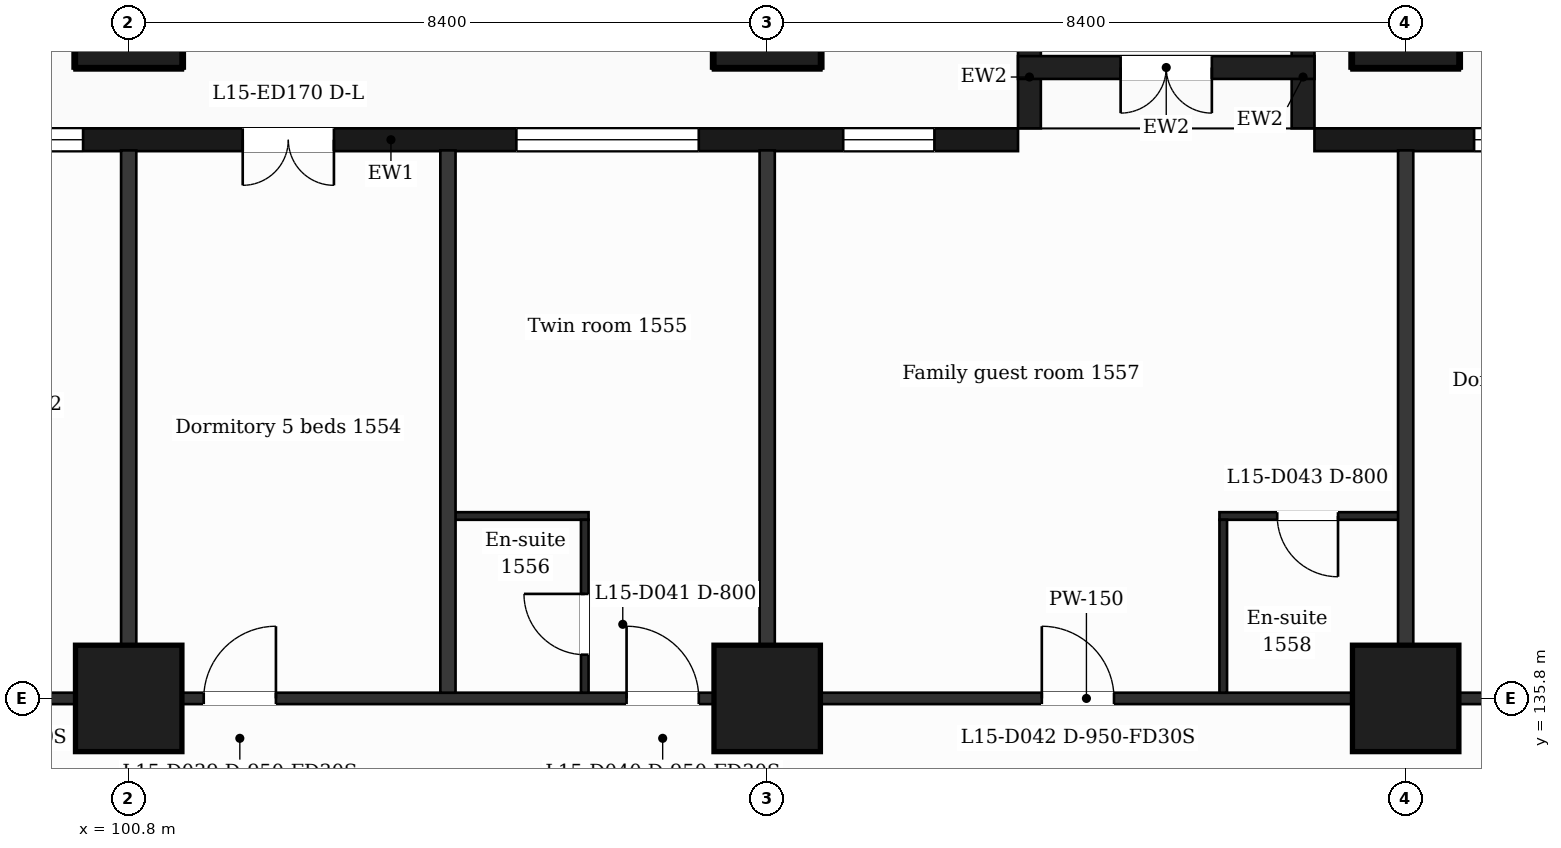
"""IFC4 building model, lengths in metres.
Left out: names, types, materials, properties, quantities, classifications, styles, units other than length and angle.
Written with IfcOpenShell. Run it as: python <this file> out.ifc"""

import sys

from ifc_helpers import new_model, si_unit, direction, frame, frame_2d, origin, origin_2d, place, context, subcontext, project, spatial, rectangle, extrude, element, fill, save


model = new_model("IFC4")
c1 = context("Model", 3, precision=1e-05, world=origin(), true_north=direction((0.0, 1.0)))
c2 = subcontext(c1, "Body", "Model", "MODEL_VIEW")
j1 = project(units=[si_unit("LENGTHUNIT", "METRE"), si_unit("PLANEANGLEUNIT", "RADIAN")], contexts=[c1])
p1 = place(None, origin())
s1 = spatial("IfcSite", under=j1, at=p1, CompositionType="ELEMENT")
p2 = place(p1, origin())
s2 = spatial("IfcBuilding", under=s1, at=p2, CompositionType="ELEMENT")
p3 = place(p2, frame((0.0, 0.0, 70.5)))
s3 = spatial("IfcBuildingStorey", under=s2, at=p3, CompositionType="ELEMENT", Elevation=70.5)
for number, where, z_axis, x_axis in (
    (1, (100.8, 135.8, 0.0), (0.0, 0.0, 1.0), (1.0, 0.0, 0.0)),
    (2, (109.2, 135.8, 0.0), (0.0, 0.0, 1.0), (1.0, 0.0, 0.0)),
    (3, (117.6, 135.8, 0.0), (0.0, 0.0, 1.0), (1.0, 0.0, 0.0)),
    (4, (100.8, 144.8, 0.0), (0.0, 0.0, 1.0), (1.0, 0.0, 0.0)),
    (5, (109.2, 144.8, 0.0), (0.0, 0.0, 1.0), (1.0, 0.0, 0.0)),
    (6, (117.6, 144.8, 0.0), (0.0, 0.0, 1.0), (1.0, 0.0, 0.0)),
):
    element("IfcColumn", number, at=place(p3, frame(where, z_axis=z_axis, x_axis=x_axis)), inside=s3, PredefinedType="COLUMN", context=c2, shape_type="SweptSolid", body=[
        extrude(rectangle(XDim=1.4, YDim=1.4, at=origin_2d()), origin(), (0.0, 0.0, 1.0), 3.5),
    ])
p4 = place(p3, frame((130.65, 143.15, 0.0), z_axis=(0.0, 0.0, 1.0), x_axis=(-1.0, 0.0, 0.0)))
e7 = element("IfcWall", 7, at=p4, inside=s3, PredefinedType="SOLIDWALL", context=c2, shape_type="SweptSolid", body=[
    extrude(rectangle(XDim=14.25, YDim=0.3, at=frame_2d((7.125, 0.0))), origin(), (0.0, 0.0, 1.0), 3.18),
])
p5 = place(p4, frame((1.35, 0.0, 0.9)))
e8 = element("IfcOpeningElement", 8, at=p5, cuts=e7, PredefinedType="OPENING", context=c2, shape_type="SweptSolid", body=[
    extrude(rectangle(XDim=2.4, YDim=2.1, at=frame_2d((1.2, 1.05))), frame((0.0, 0.16, 0.0), z_axis=(0.0, -1.0, 0.0), x_axis=(1.0, 0.0, 0.0)), (0.0, 0.0, 1.0), 0.32),
])
p6 = place(p4, frame((6.15, 0.0, 0.0)))
e9 = element("IfcOpeningElement", 9, at=p6, cuts=e7, PredefinedType="OPENING", context=c2, shape_type="SweptSolid", body=[
    extrude(rectangle(XDim=1.2, YDim=2.4, at=frame_2d((0.6, 1.2))), frame((0.0, 0.16, 0.0), z_axis=(0.0, -1.0, 0.0), x_axis=(1.0, 0.0, 0.0)), (0.0, 0.0, 1.0), 0.32),
])
p7 = place(p4, frame((9.75, 0.0, 0.9)))
e10 = element("IfcOpeningElement", 10, at=p7, cuts=e7, PredefinedType="OPENING", context=c2, shape_type="SweptSolid", body=[
    extrude(rectangle(XDim=2.4, YDim=2.1, at=frame_2d((1.2, 1.05))), frame((0.0, 0.16, 0.0), z_axis=(0.0, -1.0, 0.0), x_axis=(1.0, 0.0, 0.0)), (0.0, 0.0, 1.0), 0.32),
])
p8 = place(p3, frame((112.5, 143.15, 0.0), z_axis=(0.0, 0.0, 1.0), x_axis=(-1.0, 0.0, 0.0)))
e11 = element("IfcWall", 11, at=p8, inside=s3, PredefinedType="SOLIDWALL", context=c2, shape_type="SweptSolid", body=[
    extrude(rectangle(XDim=16.5, YDim=0.3, at=frame_2d((8.25, 0.0))), origin(), (0.0, 0.0, 1.0), 3.18),
])
p9 = place(p8, frame((1.1, 0.0, 0.9)))
e12 = element("IfcOpeningElement", 12, at=p9, cuts=e11, PredefinedType="OPENING", context=c2, shape_type="SweptSolid", body=[
    extrude(rectangle(XDim=1.2, YDim=2.1, at=frame_2d((0.6, 1.05))), frame((0.0, 0.16, 0.0), z_axis=(0.0, -1.0, 0.0), x_axis=(1.0, 0.0, 0.0)), (0.0, 0.0, 1.0), 0.32),
])
p10 = place(p8, frame((4.2, 0.0, 0.9)))
e13 = element("IfcOpeningElement", 13, at=p10, cuts=e11, PredefinedType="OPENING", context=c2, shape_type="SweptSolid", body=[
    extrude(rectangle(XDim=2.4, YDim=2.1, at=frame_2d((1.2, 1.05))), frame((0.0, 0.16, 0.0), z_axis=(0.0, -1.0, 0.0), x_axis=(1.0, 0.0, 0.0)), (0.0, 0.0, 1.0), 0.32),
])
p11 = place(p8, frame((9.0, 0.0, 0.0)))
e14 = element("IfcOpeningElement", 14, at=p11, cuts=e11, PredefinedType="OPENING", context=c2, shape_type="SweptSolid", body=[
    extrude(rectangle(XDim=1.2, YDim=2.4, at=frame_2d((0.6, 1.2))), frame((0.0, 0.16, 0.0), z_axis=(0.0, -1.0, 0.0), x_axis=(1.0, 0.0, 0.0)), (0.0, 0.0, 1.0), 0.32),
])
p12 = place(p8, frame((12.3, 0.0, 0.9)))
e15 = element("IfcOpeningElement", 15, at=p12, cuts=e11, PredefinedType="OPENING", context=c2, shape_type="SweptSolid", body=[
    extrude(rectangle(XDim=1.2, YDim=2.1, at=frame_2d((0.6, 1.05))), frame((0.0, 0.16, 0.0), z_axis=(0.0, -1.0, 0.0), x_axis=(1.0, 0.0, 0.0)), (0.0, 0.0, 1.0), 0.32),
])
p13 = place(p8, frame((14.1, 0.0, 0.9)))
e16 = element("IfcOpeningElement", 16, at=p13, cuts=e11, PredefinedType="OPENING", context=c2, shape_type="SweptSolid", body=[
    extrude(rectangle(XDim=1.2, YDim=2.1, at=frame_2d((0.6, 1.05))), frame((0.0, 0.16, 0.0), z_axis=(0.0, -1.0, 0.0), x_axis=(1.0, 0.0, 0.0)), (0.0, 0.0, 1.0), 0.32),
])
for number, where, z_axis, x_axis in (
    (17, (116.25, 143.3, 0.0), (0.0, 0.0, 1.0), (0.0, 1.0, 0.0)),
    (18, (112.65, 143.3, 0.0), (0.0, 0.0, 1.0), (0.0, 1.0, 0.0)),
):
    element("IfcWall", number, at=place(p3, frame(where, z_axis=z_axis, x_axis=x_axis)), inside=s3, PredefinedType="SOLIDWALL", context=c2, shape_type="SweptSolid", body=[
        extrude(rectangle(XDim=1.35, YDim=0.3, at=frame_2d((0.675, 0.0))), origin(), (0.0, 0.0, 1.0), 3.18),
    ])
p14 = place(p3, frame((116.4, 144.1, 0.0), z_axis=(0.0, 0.0, 1.0), x_axis=(-1.0, 0.0, 0.0)))
e19 = element("IfcWall", 19, at=p14, inside=s3, PredefinedType="SOLIDWALL", context=c2, shape_type="SweptSolid", body=[
    extrude(rectangle(XDim=3.9, YDim=0.3, at=frame_2d((1.95, 0.0))), origin(), (0.0, 0.0, 1.0), 3.18),
])
p15 = place(p14, frame((1.35, 0.0, 0.0)))
e20 = element("IfcOpeningElement", 20, at=p15, cuts=e19, PredefinedType="OPENING", context=c2, shape_type="SweptSolid", body=[
    extrude(rectangle(XDim=1.2, YDim=2.4, at=frame_2d((0.6, 1.2))), frame((0.0, 0.16, 0.0), z_axis=(0.0, -1.0, 0.0), x_axis=(1.0, 0.0, 0.0)), (0.0, 0.0, 1.0), 0.32),
])
p16 = place(p3, frame((90.895, 135.8, 0.0), z_axis=(0.0, 0.0, 1.0), x_axis=(1.0, 0.0, 0.0)))
e21 = element("IfcWall", 21, at=p16, inside=s3, PredefinedType="PARTITIONING", context=c2, shape_type="SweptSolid", body=[
    extrude(rectangle(XDim=45.011, YDim=0.15, at=frame_2d((22.505, 0.0))), origin(), (0.0, 0.0, 1.0), 3.18),
])
p17 = place(p16, frame((7.068, 0.0, 0.0)))
e22 = element("IfcOpeningElement", 22, at=p17, cuts=e21, PredefinedType="OPENING", context=c2, shape_type="SweptSolid", body=[
    extrude(rectangle(XDim=0.95, YDim=2.1, at=frame_2d((0.475, 1.05))), frame((0.0, 0.085, 0.0), z_axis=(0.0, -1.0, 0.0), x_axis=(1.0, 0.0, 0.0)), (0.0, 0.0, 1.0), 0.17),
])
p18 = place(p16, frame((10.892, 0.0, 0.0)))
e23 = element("IfcOpeningElement", 23, at=p18, cuts=e21, PredefinedType="OPENING", context=c2, shape_type="SweptSolid", body=[
    extrude(rectangle(XDim=0.95, YDim=2.1, at=frame_2d((0.475, 1.05))), frame((0.0, 0.085, 0.0), z_axis=(0.0, -1.0, 0.0), x_axis=(1.0, 0.0, 0.0)), (0.0, 0.0, 1.0), 0.17),
])
p19 = place(p16, frame((16.455, 0.0, 0.0)))
e24 = element("IfcOpeningElement", 24, at=p19, cuts=e21, PredefinedType="OPENING", context=c2, shape_type="SweptSolid", body=[
    extrude(rectangle(XDim=0.95, YDim=2.1, at=frame_2d((0.475, 1.05))), frame((0.0, 0.085, 0.0), z_axis=(0.0, -1.0, 0.0), x_axis=(1.0, 0.0, 0.0)), (0.0, 0.0, 1.0), 0.17),
])
p20 = place(p16, frame((21.918, 0.0, 0.0)))
e25 = element("IfcOpeningElement", 25, at=p20, cuts=e21, PredefinedType="OPENING", context=c2, shape_type="SweptSolid", body=[
    extrude(rectangle(XDim=0.95, YDim=2.1, at=frame_2d((0.475, 1.05))), frame((0.0, 0.085, 0.0), z_axis=(0.0, -1.0, 0.0), x_axis=(1.0, 0.0, 0.0)), (0.0, 0.0, 1.0), 0.17),
])
p21 = place(p16, frame((28.969, 0.0, 0.0)))
e26 = element("IfcOpeningElement", 26, at=p21, cuts=e21, PredefinedType="OPENING", context=c2, shape_type="SweptSolid", body=[
    extrude(rectangle(XDim=0.95, YDim=2.1, at=frame_2d((0.475, 1.05))), frame((0.0, 0.085, 0.0), z_axis=(0.0, -1.0, 0.0), x_axis=(1.0, 0.0, 0.0)), (0.0, 0.0, 1.0), 0.17),
])
p22 = place(p16, frame((32.531, 0.0, 0.0)))
e27 = element("IfcOpeningElement", 27, at=p22, cuts=e21, PredefinedType="OPENING", context=c2, shape_type="SweptSolid", body=[
    extrude(rectangle(XDim=0.95, YDim=2.1, at=frame_2d((0.475, 1.05))), frame((0.0, 0.085, 0.0), z_axis=(0.0, -1.0, 0.0), x_axis=(1.0, 0.0, 0.0)), (0.0, 0.0, 1.0), 0.17),
])
p23 = place(p16, frame((40.929, 0.0, 0.0)))
e28 = element("IfcOpeningElement", 28, at=p23, cuts=e21, PredefinedType="OPENING", context=c2, shape_type="SweptSolid", body=[
    extrude(rectangle(XDim=0.95, YDim=2.1, at=frame_2d((0.475, 1.05))), frame((0.0, 0.085, 0.0), z_axis=(0.0, -1.0, 0.0), x_axis=(1.0, 0.0, 0.0)), (0.0, 0.0, 1.0), 0.17),
])
p24 = place(p3, frame((105.0, 138.2, 0.0), z_axis=(0.0, 0.0, 1.0), x_axis=(1.0, 0.0, 0.0)))
e29 = element("IfcWall", 29, at=p24, inside=s3, PredefinedType="PARTITIONING", context=c2, shape_type="SweptSolid", body=[
    extrude(rectangle(XDim=1.85, YDim=0.1, at=frame_2d((0.925, 0.0))), origin(), (0.0, 0.0, 1.0), 3.18),
])
p25 = place(p3, frame((115.15, 138.2, 0.0), z_axis=(0.0, 0.0, 1.0), x_axis=(1.0, 0.0, 0.0)))
e30 = element("IfcWall", 30, at=p25, inside=s3, PredefinedType="PARTITIONING", context=c2, shape_type="SweptSolid", body=[
    extrude(rectangle(XDim=2.45, YDim=0.1, at=frame_2d((1.225, 0.0))), origin(), (0.0, 0.0, 1.0), 3.18),
])
p26 = place(p25, frame((0.76, 0.0, 0.0)))
e31 = element("IfcOpeningElement", 31, at=p26, cuts=e30, PredefinedType="OPENING", context=c2, shape_type="SweptSolid", body=[
    extrude(rectangle(XDim=0.8, YDim=2.1, at=frame_2d((0.4, 1.05))), frame((0.0, 0.06, 0.0), z_axis=(0.0, -1.0, 0.0), x_axis=(1.0, 0.0, 0.0)), (0.0, 0.0, 1.0), 0.12),
])
for number, where, z_axis, x_axis in (
    (32, (100.8, 135.875, 0.0), (0.0, 0.0, 1.0), (0.0, 1.0, 0.0)),
    (33, (105.0, 135.875, 0.0), (0.0, 0.0, 1.0), (0.0, 1.0, 0.0)),
):
    element("IfcWall", number, at=place(p3, frame(where, z_axis=z_axis, x_axis=x_axis)), inside=s3, PredefinedType="PARTITIONING", context=c2, shape_type="SweptSolid", body=[
        extrude(rectangle(XDim=7.135, YDim=0.2, at=frame_2d((3.567, 0.0))), origin(), (0.0, 0.0, 1.0), 3.18),
    ])
p27 = place(p3, frame((106.8, 135.875, 0.0), z_axis=(0.0, 0.0, 1.0), x_axis=(0.0, 1.0, 0.0)))
e34 = element("IfcWall", 34, at=p27, inside=s3, PredefinedType="PARTITIONING", context=c2, shape_type="SweptSolid", body=[
    extrude(rectangle(XDim=2.275, YDim=0.1, at=frame_2d((1.137, 0.0))), origin(), (0.0, 0.0, 1.0), 3.18),
])
p28 = place(p27, frame((0.5, 0.0, 0.0)))
e35 = element("IfcOpeningElement", 35, at=p28, cuts=e34, PredefinedType="OPENING", context=c2, shape_type="SweptSolid", body=[
    extrude(rectangle(XDim=0.8, YDim=2.1, at=frame_2d((0.4, 1.05))), frame((0.0, 0.06, 0.0), z_axis=(0.0, -1.0, 0.0), x_axis=(1.0, 0.0, 0.0)), (0.0, 0.0, 1.0), 0.12),
])
p29 = place(p3, frame((109.2, 135.875, 0.0), z_axis=(0.0, 0.0, 1.0), x_axis=(0.0, 1.0, 0.0)))
e36 = element("IfcWall", 36, at=p29, inside=s3, PredefinedType="PARTITIONING", context=c2, shape_type="SweptSolid", body=[
    extrude(rectangle(XDim=7.135, YDim=0.2, at=frame_2d((3.567, 0.0))), origin(), (0.0, 0.0, 1.0), 3.18),
])
p30 = place(p3, frame((115.2, 135.875, 0.0), z_axis=(0.0, 0.0, 1.0), x_axis=(0.0, 1.0, 0.0)))
e37 = element("IfcWall", 37, at=p30, inside=s3, PredefinedType="PARTITIONING", context=c2, shape_type="SweptSolid", body=[
    extrude(rectangle(XDim=2.275, YDim=0.1, at=frame_2d((1.137, 0.0))), origin(), (0.0, 0.0, 1.0), 3.18),
])
p31 = place(p3, frame((117.6, 135.875, 0.0), z_axis=(0.0, 0.0, 1.0), x_axis=(0.0, 1.0, 0.0)))
e38 = element("IfcWall", 38, at=p31, inside=s3, PredefinedType="PARTITIONING", context=c2, shape_type="SweptSolid", body=[
    extrude(rectangle(XDim=7.135, YDim=0.2, at=frame_2d((3.567, 0.0))), origin(), (0.0, 0.0, 1.0), 3.18),
])
p32 = place(p7, origin())
e39 = element("IfcWindow", 39, at=p32, inside=s3, PartitioningType="SINGLE_PANEL", PredefinedType="WINDOW", context=c2, shape_type="SweptSolid", body=[
    extrude(rectangle(XDim=2.4, YDim=2.1, at=frame_2d((1.2, 1.05))), frame((0.0, 0.03, 0.0), z_axis=(0.0, -1.0, 0.0), x_axis=(1.0, 0.0, 0.0)), (0.0, 0.0, 1.0), 0.06),
])
fill(e10, e39)
p33 = place(p9, origin())
e40 = element("IfcWindow", 40, at=p33, inside=s3, PartitioningType="SINGLE_PANEL", PredefinedType="WINDOW", context=c2, shape_type="SweptSolid", body=[
    extrude(rectangle(XDim=1.2, YDim=2.1, at=frame_2d((0.6, 1.05))), frame((0.0, 0.03, 0.0), z_axis=(0.0, -1.0, 0.0), x_axis=(1.0, 0.0, 0.0)), (0.0, 0.0, 1.0), 0.06),
])
fill(e12, e40)
p34 = place(p10, origin())
e41 = element("IfcWindow", 41, at=p34, inside=s3, PartitioningType="SINGLE_PANEL", PredefinedType="WINDOW", context=c2, shape_type="SweptSolid", body=[
    extrude(rectangle(XDim=2.4, YDim=2.1, at=frame_2d((1.2, 1.05))), frame((0.0, 0.03, 0.0), z_axis=(0.0, -1.0, 0.0), x_axis=(1.0, 0.0, 0.0)), (0.0, 0.0, 1.0), 0.06),
])
fill(e13, e41)
p35 = place(p11, origin())
e42 = element("IfcDoor", 42, at=p35, inside=s3, OperationType="DOUBLE_DOOR_SINGLE_SWING", PredefinedType="DOOR", context=c2, shape_type="SweptSolid", body=[
    extrude(rectangle(XDim=1.2, YDim=2.4, at=frame_2d((0.6, 1.2))), frame((0.0, 0.025, 0.0), z_axis=(0.0, -1.0, 0.0), x_axis=(1.0, 0.0, 0.0)), (0.0, 0.0, 1.0), 0.05),
])
fill(e14, e42)
p36 = place(p12, origin())
e43 = element("IfcWindow", 43, at=p36, inside=s3, PartitioningType="SINGLE_PANEL", PredefinedType="WINDOW", context=c2, shape_type="SweptSolid", body=[
    extrude(rectangle(XDim=1.2, YDim=2.1, at=frame_2d((0.6, 1.05))), frame((0.0, 0.03, 0.0), z_axis=(0.0, -1.0, 0.0), x_axis=(1.0, 0.0, 0.0)), (0.0, 0.0, 1.0), 0.06),
])
fill(e15, e43)
p37 = place(p15, origin())
e44 = element("IfcDoor", 44, at=p37, inside=s3, OperationType="DOUBLE_DOOR_SINGLE_SWING", PredefinedType="DOOR", context=c2, shape_type="SweptSolid", body=[
    extrude(rectangle(XDim=1.2, YDim=2.4, at=frame_2d((0.6, 1.2))), frame((0.0, 0.025, 0.0), z_axis=(0.0, -1.0, 0.0), x_axis=(1.0, 0.0, 0.0)), (0.0, 0.0, 1.0), 0.05),
])
fill(e20, e44)
p38 = place(p18, origin())
e45 = element("IfcDoor", 45, at=p38, inside=s3, OperationType="SINGLE_SWING_RIGHT", PredefinedType="DOOR", context=c2, shape_type="SweptSolid", body=[
    extrude(rectangle(XDim=0.95, YDim=2.1, at=frame_2d((0.475, 1.05))), frame((0.0, 0.025, 0.0), z_axis=(0.0, -1.0, 0.0), x_axis=(1.0, 0.0, 0.0)), (0.0, 0.0, 1.0), 0.05),
])
fill(e23, e45)
p39 = place(p19, origin())
e46 = element("IfcDoor", 46, at=p39, inside=s3, OperationType="SINGLE_SWING_LEFT", PredefinedType="DOOR", context=c2, shape_type="SweptSolid", body=[
    extrude(rectangle(XDim=0.95, YDim=2.1, at=frame_2d((0.475, 1.05))), frame((0.0, 0.025, 0.0), z_axis=(0.0, -1.0, 0.0), x_axis=(1.0, 0.0, 0.0)), (0.0, 0.0, 1.0), 0.05),
])
fill(e24, e46)
p40 = place(p28, origin())
e47 = element("IfcDoor", 47, at=p40, inside=s3, OperationType="SINGLE_SWING_RIGHT", PredefinedType="DOOR", context=c2, shape_type="SweptSolid", body=[
    extrude(rectangle(XDim=0.8, YDim=2.1, at=frame_2d((0.4, 1.05))), frame((0.0, 0.025, 0.0), z_axis=(0.0, -1.0, 0.0), x_axis=(1.0, 0.0, 0.0)), (0.0, 0.0, 1.0), 0.05),
])
fill(e35, e47)
p41 = place(p20, origin())
e48 = element("IfcDoor", 48, at=p41, inside=s3, OperationType="SINGLE_SWING_LEFT", PredefinedType="DOOR", context=c2, shape_type="SweptSolid", body=[
    extrude(rectangle(XDim=0.95, YDim=2.1, at=frame_2d((0.475, 1.05))), frame((0.0, 0.025, 0.0), z_axis=(0.0, -1.0, 0.0), x_axis=(1.0, 0.0, 0.0)), (0.0, 0.0, 1.0), 0.05),
])
fill(e25, e48)
p42 = place(p26, origin())
e49 = element("IfcDoor", 49, at=p42, inside=s3, OperationType="SINGLE_SWING_RIGHT", PredefinedType="DOOR", context=c2, shape_type="SweptSolid", body=[
    extrude(rectangle(XDim=0.8, YDim=2.1, at=frame_2d((0.4, 1.05))), frame((0.0, 0.025, 0.0), z_axis=(0.0, -1.0, 0.0), x_axis=(1.0, 0.0, 0.0)), (0.0, 0.0, 1.0), 0.05),
])
fill(e31, e49)
save(model, sys.argv[1])
